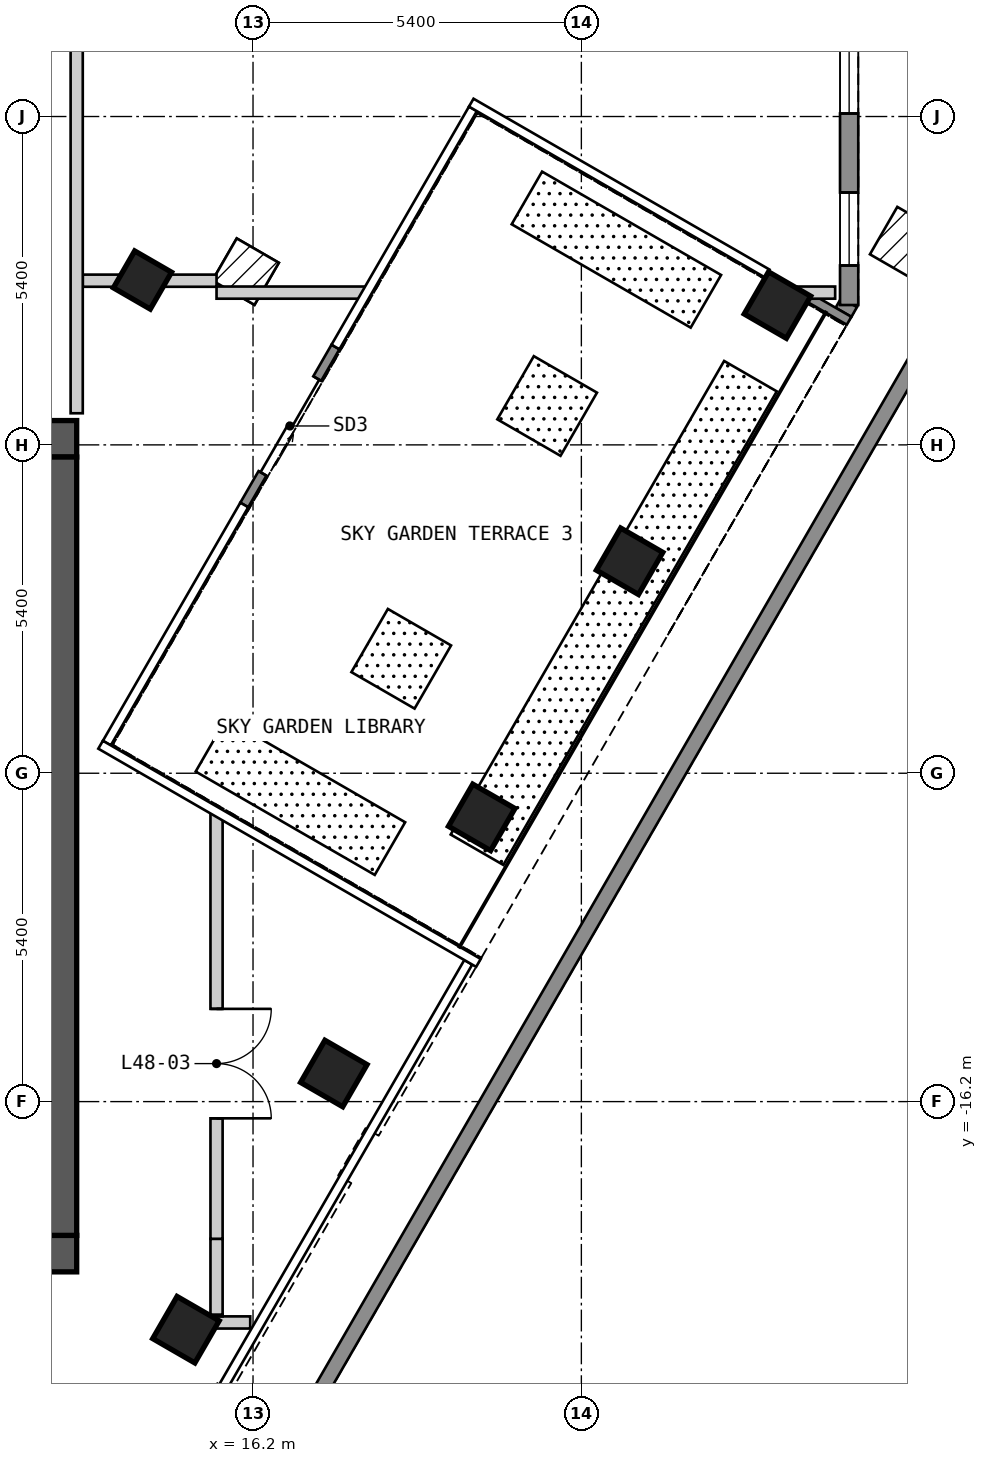
"""IFC4 building model, lengths in metres.
Left out: names, types, materials, properties, quantities, classifications, styles, units other than length and angle.
Written with IfcOpenShell. Run it as: python <this file> out.ifc"""

import sys

from ifc_helpers import new_model, si_unit, direction, frame, frame_2d, origin, origin_2d, place, context, subcontext, project, spatial, polyline, rectangle, outline, extrude, element, fill, save


model = new_model("IFC4")
c1 = context("Model", 3, precision=1e-05, world=origin(), true_north=direction((0.0, 1.0)))
c2 = subcontext(c1, "Body", "Model", "MODEL_VIEW")
j1 = project(units=[si_unit("LENGTHUNIT", "METRE"), si_unit("PLANEANGLEUNIT", "RADIAN")], contexts=[c1])
p1 = place(None, origin())
s1 = spatial("IfcSite", under=j1, at=p1, CompositionType="ELEMENT")
p2 = place(p1, origin())
s2 = spatial("IfcBuilding", under=s1, at=p2, CompositionType="ELEMENT")
p3 = place(p2, frame((0.0, 0.0, 157.2)))
s3 = spatial("IfcBuildingStorey", under=s2, at=p3, CompositionType="ELEMENT", Elevation=157.2)
for number, where, z_axis, x_axis in (
    (1, (15.097, -19.951, 0.0), (0.0, 0.0, 1.0), (0.5, 0.866, 0.0)),
    (2, (17.529, -15.738, 0.0), (0.0, 0.0, 1.0), (0.5, 0.866, 0.0)),
    (3, (19.961, -11.526, 0.0), (0.0, 0.0, 1.0), (0.5, 0.866, 0.0)),
    (4, (22.393, -7.314, 0.0), (0.0, 0.0, 1.0), (0.5, 0.866, 0.0)),
    (5, (24.825, -3.101, 0.0), (0.0, 0.0, 1.0), (0.5, 0.866, 0.0)),
):
    element("IfcColumn", number, at=place(p3, frame(where, z_axis=z_axis, x_axis=x_axis)), inside=s3, PredefinedType="COLUMN", context=c2, shape_type="SweptSolid", body=[
        extrude(rectangle(XDim=0.8, YDim=0.8, at=origin_2d()), origin(), (0.0, 0.0, 1.0), 6.0),
    ])
p4 = place(p3, frame((14.382, -2.689, 0.0), z_axis=(0.0, 0.0, 1.0), x_axis=(0.5, 0.866025403784, 0.0)))
e6 = element("IfcColumn", 6, at=p4, inside=s3, PredefinedType="COLUMN", context=c2, shape_type="SweptSolid", body=[
    extrude(rectangle(XDim=0.7, YDim=0.7, at=origin_2d()), origin(), (0.0, 0.0, 1.0), 6.0),
])
p5 = place(p3, frame((-13.3, -18.7, 0.0), z_axis=(0.0, 0.0, 1.0), x_axis=(1.0, 0.0, 0.0)))
e7 = element("IfcWall", 7, at=p5, inside=s3, PredefinedType="SHEAR", context=c2, shape_type="SweptSolid", body=[
    extrude(rectangle(XDim=26.6, YDim=0.6, at=frame_2d((13.3, 0.0))), origin(), (0.0, 0.0, 1.0), 5.7),
])
p6 = place(p3, frame((-13.3, -5.3, 0.0), z_axis=(0.0, 0.0, 1.0), x_axis=(1.0, 0.0, 0.0)))
e8 = element("IfcWall", 8, at=p6, inside=s3, PredefinedType="SHEAR", context=c2, shape_type="SweptSolid", body=[
    extrude(rectangle(XDim=26.6, YDim=0.6, at=frame_2d((13.3, 0.0))), origin(), (0.0, 0.0, 1.0), 5.7),
])
p7 = place(p6, frame((23.65, 0.0, 0.0)))
e9 = element("IfcOpeningElement", 9, at=p7, cuts=e8, PredefinedType="OPENING", context=c2, shape_type="SweptSolid", body=[
    extrude(rectangle(XDim=1.2, YDim=2.1, at=frame_2d((0.6, 1.05))), frame((0.0, 0.31, 0.0), z_axis=(0.0, -1.0, 0.0), x_axis=(1.0, 0.0, 0.0)), (0.0, 0.0, 1.0), 0.62),
])
p8 = place(p3, frame((13.0, -18.4, 0.0), z_axis=(0.0, 0.0, 1.0), x_axis=(0.0, 1.0, 0.0)))
e10 = element("IfcWall", 10, at=p8, inside=s3, PredefinedType="SHEAR", context=c2, shape_type="SweptSolid", body=[
    extrude(rectangle(XDim=12.8, YDim=0.6, at=frame_2d((6.4, 0.0))), origin(), (0.0, 0.0, 1.0), 5.7),
])
p9 = place(p3, frame((25.911, -3.22, 0.0), z_axis=(0.0, 0.0, 1.0), x_axis=(0.498843983803, 0.866691802098, 0.0)))
e11 = element("IfcWall", 11, at=p9, inside=s3, PredefinedType="SOLIDWALL", context=c2, shape_type="SweptSolid", body=[
    extrude(rectangle(XDim=0.185, YDim=0.3, at=frame_2d((0.092, 0.0))), origin(), (0.0, 0.0, 1.0), 5.7),
])
p10 = place(p3, frame((26.004, -3.1, 0.0), z_axis=(0.0, 0.0, 1.0), x_axis=(0.0, 1.0, 0.0)))
e12 = element("IfcWall", 12, at=p10, inside=s3, PredefinedType="SOLIDWALL", context=c2, shape_type="SweptSolid", body=[
    extrude(outline(polyline([(0.0, -0.15), (5.0, -0.15), (4.92, 0.15), (0.08, 0.15), (0.0, -0.15)])), origin(), (0.0, 0.0, 1.0), 5.7),
])
p11 = place(p10, frame((0.65, 0.0, 0.15)))
e13 = element("IfcOpeningElement", 13, at=p11, cuts=e12, PredefinedType="OPENING", context=c2, shape_type="SweptSolid", body=[
    extrude(rectangle(XDim=1.2, YDim=2.1, at=frame_2d((0.6, 1.05))), frame((0.0, 0.16, 0.0), z_axis=(0.0, -1.0, 0.0), x_axis=(1.0, 0.0, 0.0)), (0.0, 0.0, 1.0), 0.32),
])
p12 = place(p10, frame((3.15, 0.0, 0.15)))
e14 = element("IfcOpeningElement", 14, at=p12, cuts=e12, PredefinedType="OPENING", context=c2, shape_type="SweptSolid", body=[
    extrude(rectangle(XDim=1.2, YDim=2.1, at=frame_2d((0.6, 1.05))), frame((0.0, 0.16, 0.0), z_axis=(0.0, -1.0, 0.0), x_axis=(1.0, 0.0, 0.0)), (0.0, 0.0, 1.0), 0.32),
])
p13 = place(p3, frame((16.056, -6.388, 0.0), z_axis=(0.0, 0.0, 1.0), x_axis=(0.50002537861, 0.866010750942, 0.0)))
e15 = element("IfcWall", 15, at=p13, inside=s3, PredefinedType="SOLIDWALL", context=c2, shape_type="SweptSolid", body=[
    extrude(rectangle(XDim=3.0, YDim=0.15, at=frame_2d((1.5, 0.0))), origin(), (0.0, 0.0, 1.0), 5.7),
])
p14 = place(p13, frame((0.6, 0.0, 0.0)))
e16 = element("IfcOpeningElement", 16, at=p14, cuts=e15, PredefinedType="OPENING", context=c2, shape_type="SweptSolid", body=[
    extrude(rectangle(XDim=1.8, YDim=2.4, at=frame_2d((0.9, 1.2))), frame((0.0, 0.085, 0.0), z_axis=(0.0, -1.0, 0.0), x_axis=(1.0, 0.0, 0.0)), (0.0, 0.0, 1.0), 0.17),
])
p15 = place(p3, frame((26.003, -3.359, 0.0), z_axis=(0.0, 0.0, 1.0), x_axis=(-0.86636022879, 0.499419617126, 0.0)))
e17 = element("IfcWall", 17, at=p15, inside=s3, PredefinedType="SOLIDWALL", context=c2, shape_type="SweptSolid", body=[
    extrude(rectangle(XDim=0.745, YDim=0.15, at=frame_2d((0.372, 0.0))), origin(), (0.0, 0.0, 1.0), 5.7),
])
p16 = place(p3, frame((28.24, -2.038, 0.0), z_axis=(0.0, 0.0, 1.0), x_axis=(-0.500068533128, -0.865985832549, 0.0)))
e18 = element("IfcWall", 18, at=p16, inside=s3, PredefinedType="PARAPET", context=c2, shape_type="SweptSolid", body=[
    extrude(outline(polyline([(0.067, -0.125), (24.644, -0.125), (24.71, 0.125), (0.0, 0.125), (0.067, -0.125)])), origin(), (0.0, 0.0, 1.0), 1.6),
])
p17 = place(p3, frame((15.6, -19.832, 0.0), z_axis=(0.0, 0.0, 1.0), x_axis=(1.0, 0.0, 0.0)))
e19 = element("IfcWall", 19, at=p17, inside=s3, PredefinedType="PARTITIONING", context=c2, shape_type="SweptSolid", body=[
    extrude(rectangle(XDim=0.554, YDim=0.2, at=frame_2d((0.277, 0.0))), origin(), (0.0, 0.0, 1.0), 5.7),
])
p18 = place(p3, frame((15.6, -2.896, 0.0), z_axis=(0.0, 0.0, 1.0), x_axis=(1.0, 0.0, 0.0)))
e20 = element("IfcWall", 20, at=p18, inside=s3, PredefinedType="PARTITIONING", context=c2, shape_type="SweptSolid", body=[
    extrude(rectangle(XDim=2.496, YDim=0.2, at=frame_2d((1.248, 0.0))), origin(), (0.0, 0.0, 1.0), 5.7),
])
p19 = place(p3, frame((25.16, -2.896, 0.0), z_axis=(0.0, 0.0, 1.0), x_axis=(1.0, 0.0, 0.0)))
e21 = element("IfcWall", 21, at=p19, inside=s3, PredefinedType="PARTITIONING", context=c2, shape_type="SweptSolid", body=[
    extrude(rectangle(XDim=0.614, YDim=0.2, at=frame_2d((0.307, 0.0))), origin(), (0.0, 0.0, 1.0), 5.7),
])
p20 = place(p3, frame((13.4, -2.7, 0.0), z_axis=(0.0, 0.0, 1.0), x_axis=(1.0, 0.0, 0.0)))
e22 = element("IfcWall", 22, at=p20, inside=s3, PredefinedType="PARTITIONING", context=c2, shape_type="SweptSolid", body=[
    extrude(rectangle(XDim=2.2, YDim=0.2, at=frame_2d((1.1, 0.0))), origin(), (0.0, 0.0, 1.0), 5.7),
])
p21 = place(p3, frame((13.3, -4.88, 0.0), z_axis=(0.0, 0.0, 1.0), x_axis=(0.0, 1.0, 0.0)))
e23 = element("IfcWall", 23, at=p21, inside=s3, PredefinedType="PARTITIONING", context=c2, shape_type="SweptSolid", body=[
    extrude(rectangle(XDim=6.78, YDim=0.2, at=frame_2d((3.39, 0.0))), origin(), (0.0, 0.0, 1.0), 5.7),
])
p22 = place(p3, frame((15.6, -19.732, 0.0), z_axis=(0.0, 0.0, 1.0), x_axis=(0.0, 1.0, 0.0)))
e24 = element("IfcWall", 24, at=p22, inside=s3, PredefinedType="PARTITIONING", context=c2, shape_type="SweptSolid", body=[
    extrude(rectangle(XDim=0.029, YDim=0.2, at=frame_2d((0.015, 0.0))), origin(), (0.0, 0.0, 1.0), 5.7),
])
p23 = place(p3, frame((15.6, -19.703, 0.0), z_axis=(0.0, 0.0, 1.0), x_axis=(0.0, 1.0, 0.0)))
e25 = element("IfcWall", 25, at=p23, inside=s3, PredefinedType="PARTITIONING", context=c2, shape_type="SweptSolid", body=[
    extrude(rectangle(XDim=1.247, YDim=0.2, at=frame_2d((0.624, 0.0))), origin(), (0.0, 0.0, 1.0), 5.12),
])
p24 = place(p3, frame((15.6, -18.456, 0.0), z_axis=(0.0, 0.0, 1.0), x_axis=(0.0, 1.0, 0.0)))
e26 = element("IfcWall", 26, at=p24, inside=s3, PredefinedType="PARTITIONING", context=c2, shape_type="SweptSolid", body=[
    extrude(rectangle(XDim=7.047, YDim=0.2, at=frame_2d((3.523, 0.0))), origin(), (0.0, 0.0, 1.0), 5.7),
])
p25 = place(p24, frame((3.781, 0.0, 0.0), z_axis=(0.0, 0.0, 1.0), x_axis=(-1.0, 0.0, 0.0)))
e27 = element("IfcOpeningElement", 27, at=p25, cuts=e26, PredefinedType="OPENING", context=c2, shape_type="SweptSolid", body=[
    extrude(rectangle(XDim=1.8, YDim=2.1, at=frame_2d((0.9, 1.05))), frame((0.0, 0.11, 0.0), z_axis=(0.0, -1.0, 0.0), x_axis=(1.0, 0.0, 0.0)), (0.0, 0.0, 1.0), 0.22),
])
p26 = place(p11, origin())
e28 = element("IfcWindow", 28, at=p26, inside=s3, PartitioningType="SINGLE_PANEL", PredefinedType="WINDOW", context=c2, shape_type="SweptSolid", body=[
    extrude(rectangle(XDim=1.2, YDim=2.1, at=frame_2d((0.6, 1.05))), frame((0.0, 0.03, 0.0), z_axis=(0.0, -1.0, 0.0), x_axis=(1.0, 0.0, 0.0)), (0.0, 0.0, 1.0), 0.06),
])
fill(e13, e28)
p27 = place(p12, origin())
e29 = element("IfcWindow", 29, at=p27, inside=s3, PartitioningType="SINGLE_PANEL", PredefinedType="WINDOW", context=c2, shape_type="SweptSolid", body=[
    extrude(rectangle(XDim=1.2, YDim=2.1, at=frame_2d((0.6, 1.05))), frame((0.0, 0.03, 0.0), z_axis=(0.0, -1.0, 0.0), x_axis=(1.0, 0.0, 0.0)), (0.0, 0.0, 1.0), 0.06),
])
fill(e14, e29)
p28 = place(p14, origin())
e30 = element("IfcDoor", 30, at=p28, inside=s3, OperationType="SLIDING_TO_LEFT", PredefinedType="DOOR", context=c2, shape_type="SweptSolid", body=[
    extrude(rectangle(XDim=1.8, YDim=2.4, at=frame_2d((0.9, 1.2))), frame((0.0, 0.025, 0.0), z_axis=(0.0, -1.0, 0.0), x_axis=(1.0, 0.0, 0.0)), (0.0, 0.0, 1.0), 0.05),
])
fill(e16, e30)
p29 = place(p25, origin())
e31 = element("IfcDoor", 31, at=p29, inside=s3, OperationType="DOUBLE_DOOR_SINGLE_SWING", PredefinedType="DOOR", context=c2, shape_type="SweptSolid", body=[
    extrude(rectangle(XDim=1.8, YDim=2.1, at=frame_2d((0.9, 1.05))), frame((0.0, 0.025, 0.0), z_axis=(0.0, -1.0, 0.0), x_axis=(1.0, 0.0, 0.0)), (0.0, 0.0, 1.0), 0.05),
])
fill(e27, e31)
save(model, sys.argv[1])
